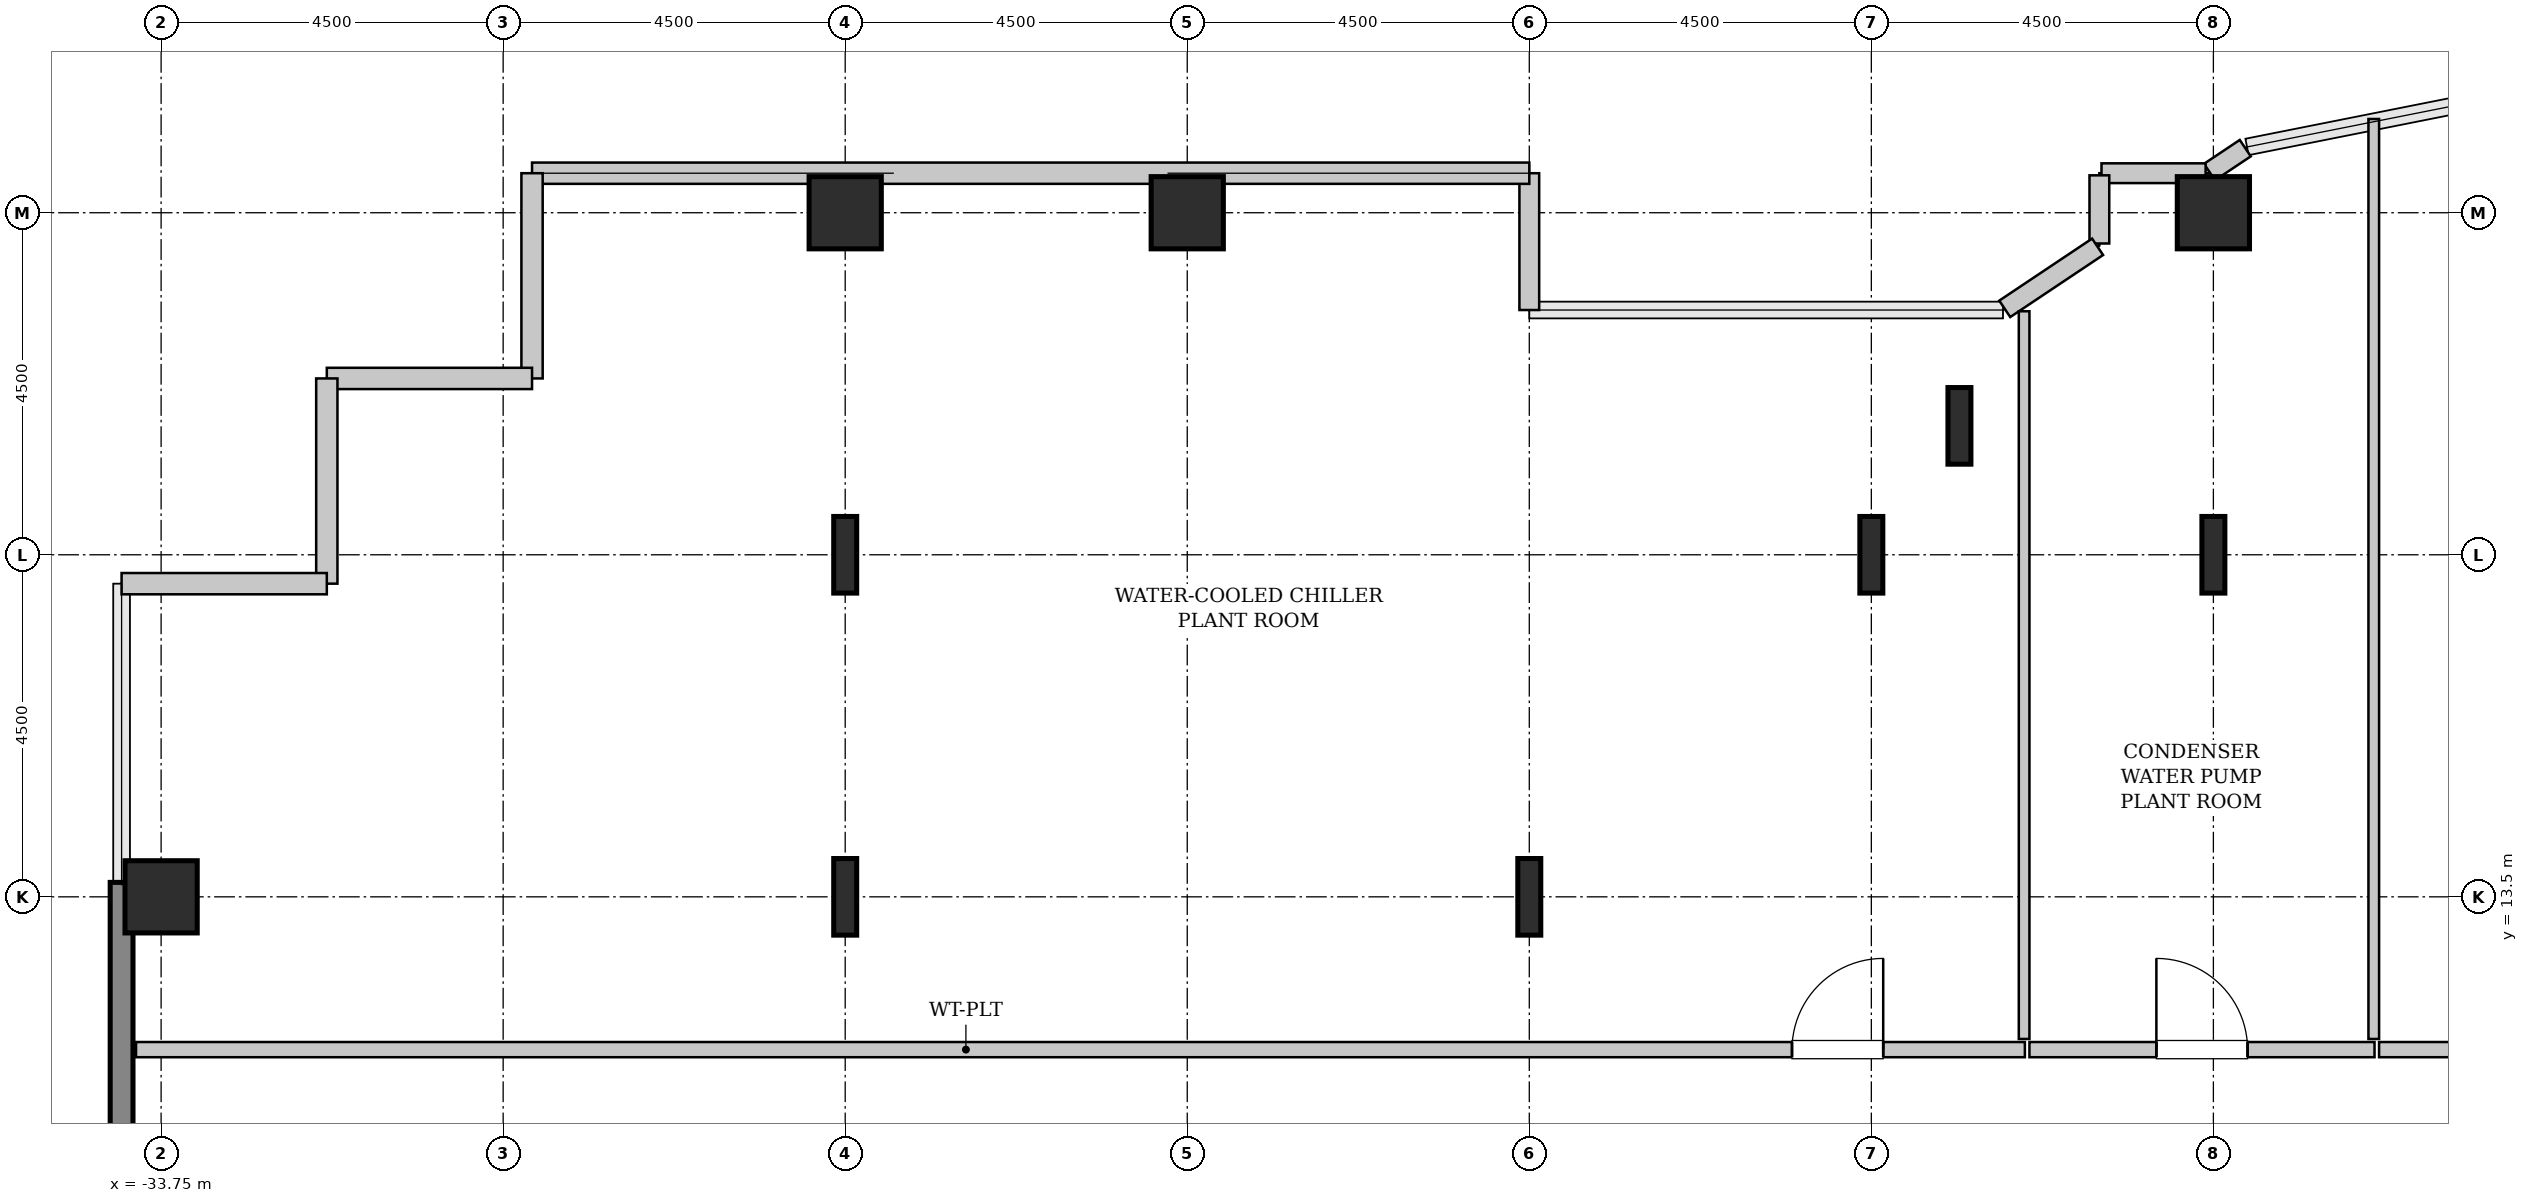
"""IFC4 building model, lengths in metres.
Left out: names, types, materials, properties, quantities, classifications, styles, units other than length and angle.
Written with IfcOpenShell. Run it as: python <this file> out.ifc"""

import sys

from ifc_helpers import new_model, si_unit, direction, frame, frame_2d, origin, origin_2d, place, context, subcontext, project, spatial, rectangle, hollow_rectangle, i_section, extrude, source, transform, mapped, element, fill, save


model = new_model("IFC4")
c1 = context("Model", 3, precision=1e-05, world=origin(), true_north=direction((0.0, 1.0)))
c2 = subcontext(c1, "Body", "Model", "MODEL_VIEW")
j1 = project(units=[si_unit("LENGTHUNIT", "METRE"), si_unit("PLANEANGLEUNIT", "RADIAN")], contexts=[c1])
p1 = place(None, origin())
s1 = spatial("IfcSite", under=j1, at=p1, CompositionType="ELEMENT")
p2 = place(p1, origin())
s2 = spatial("IfcBuilding", under=s1, at=p2, CompositionType="ELEMENT")
p3 = place(p2, frame((0.0, 0.0, 86.2)))
s3 = spatial("IfcBuildingStorey", under=s2, at=p3, CompositionType="ELEMENT", Elevation=86.2)
m1 = source(origin(), c2, "Body", "SweptSolid", [
    extrude(hollow_rectangle(XDim=0.95, YDim=0.95, WallThickness=0.045, InnerFilletRadius=0.045, OuterFilletRadius=0.09, at=origin_2d()), origin(), (0.0, 0.0, 1.0), 4.6),
])
p4 = place(p3, frame((-33.75, 13.5, 0.0), z_axis=(0.0, 0.0, 1.0), x_axis=(1.0, 0.0, 0.0)))
e1 = element("IfcColumn", 1, at=p4, inside=s3, PredefinedType="COLUMN", context=c2, shape_type="MappedRepresentation", body=[
    mapped(m1, transform((0.0, 0.0, 0.0), x_axis=(1.0, 0.0, 0.0), y_axis=(0.0, 1.0, 0.0), z_axis=(0.0, 0.0, 1.0), scale=1.0)),
])
m2 = source(origin(), c2, "Body", "SweptSolid", [
    extrude(i_section(OverallWidth=0.302, OverallDepth=1.008, WebThickness=0.021, FlangeThickness=0.04, FilletRadius=0.03, at=origin_2d()), origin(), (0.0, 0.0, 1.0), 4.6),
])
for number, where, z_axis, x_axis in (
    (2, (-24.75, 13.5, 0.0), (0.0, 0.0, 1.0), (1.0, 0.0, 0.0)),
    (3, (-24.75, 18.0, 0.0), (0.0, 0.0, 1.0), (1.0, 0.0, 0.0)),
):
    element("IfcColumn", number, at=place(p3, frame(where, z_axis=z_axis, x_axis=x_axis)), inside=s3, PredefinedType="COLUMN", context=c2, shape_type="MappedRepresentation", body=[
        mapped(m2, transform((0.0, 0.0, 0.0), x_axis=(1.0, 0.0, 0.0), y_axis=(0.0, 1.0, 0.0), z_axis=(0.0, 0.0, 1.0), scale=1.0)),
    ])
for number, where, z_axis, x_axis in (
    (4, (-24.75, 22.5, 0.0), (0.0, 0.0, 1.0), (1.0, 0.0, 0.0)),
    (5, (-20.25, 22.5, 0.0), (0.0, 0.0, 1.0), (1.0, 0.0, 0.0)),
):
    element("IfcColumn", number, at=place(p3, frame(where, z_axis=z_axis, x_axis=x_axis)), inside=s3, PredefinedType="COLUMN", context=c2, shape_type="MappedRepresentation", body=[
        mapped(m1, transform((0.0, 0.0, 0.0), x_axis=(1.0, 0.0, 0.0), y_axis=(0.0, 1.0, 0.0), z_axis=(0.0, 0.0, 1.0), scale=1.0)),
    ])
for number, where, z_axis, x_axis in (
    (6, (-15.75, 13.5, 0.0), (0.0, 0.0, 1.0), (1.0, 0.0, 0.0)),
    (7, (-11.25, 18.0, 0.0), (0.0, 0.0, 1.0), (1.0, 0.0, 0.0)),
    (8, (-10.091, 19.696, 0.0), (0.0, 0.0, 1.0), (1.0, 0.0, 0.0)),
    (9, (-6.75, 18.0, 0.0), (0.0, 0.0, 1.0), (1.0, 0.0, 0.0)),
):
    element("IfcColumn", number, at=place(p3, frame(where, z_axis=z_axis, x_axis=x_axis)), inside=s3, PredefinedType="COLUMN", context=c2, shape_type="MappedRepresentation", body=[
        mapped(m2, transform((0.0, 0.0, 0.0), x_axis=(1.0, 0.0, 0.0), y_axis=(0.0, 1.0, 0.0), z_axis=(0.0, 0.0, 1.0), scale=1.0)),
    ])
p5 = place(p3, frame((-6.75, 22.5, 0.0), z_axis=(0.0, 0.0, 1.0), x_axis=(1.0, 0.0, 0.0)))
e10 = element("IfcColumn", 10, at=p5, inside=s3, PredefinedType="COLUMN", context=c2, shape_type="MappedRepresentation", body=[
    mapped(m1, transform((0.0, 0.0, 0.0), x_axis=(1.0, 0.0, 0.0), y_axis=(0.0, 1.0, 0.0), z_axis=(0.0, 0.0, 1.0), scale=1.0)),
])
m3 = source(origin(), c2, "Body", "SweptSolid", [
    extrude(rectangle(XDim=9.38, YDim=0.3, at=frame_2d((4.69, 0.0))), origin(), (0.0, 0.0, 1.0), 4.35),
])
p6 = place(p3, frame((-34.27, 4.31, 0.0), z_axis=(0.0, 0.0, 1.0), x_axis=(0.0, 1.0, 0.0)))
e11 = element("IfcWall", 11, at=p6, inside=s3, PredefinedType="SHEAR", context=c2, shape_type="MappedRepresentation", body=[
    mapped(m3, transform((0.0, 0.0, 0.0), x_axis=(1.0, 0.0, 0.0), y_axis=(0.0, 1.0, 0.0), z_axis=(0.0, 0.0, 1.0), scale=1.0)),
])
m4 = source(origin(), c2, "Body", "SweptSolid", [
    extrude(rectangle(XDim=0.565, YDim=0.26, at=frame_2d((0.283, 0.0))), origin(), (0.0, 0.0, 1.0), 4.35),
])
p7 = place(p3, frame((-6.331, 23.35, 0.0), z_axis=(0.0, 0.0, 1.0), x_axis=(-0.831651492666, -0.555297933317, 0.0)))
e12 = element("IfcWall", 12, at=p7, inside=s3, PredefinedType="SOLIDWALL", context=c2, shape_type="MappedRepresentation", body=[
    mapped(m4, transform((0.0, 0.0, 0.0), x_axis=(1.0, 0.0, 0.0), y_axis=(0.0, 1.0, 0.0), z_axis=(0.0, 0.0, 1.0), scale=1.0)),
])
m5 = source(origin(), c2, "Body", "SweptSolid", [
    extrude(rectangle(XDim=1.37, YDim=0.26, at=frame_2d((0.685, 0.0))), origin(), (0.0, 0.0, 1.0), 4.35),
])
p8 = place(p3, frame((-6.852, 23.02, 0.0), z_axis=(0.0, 0.0, 1.0), x_axis=(-1.0, 0.0, 0.0)))
e13 = element("IfcWall", 13, at=p8, inside=s3, PredefinedType="SOLIDWALL", context=c2, shape_type="MappedRepresentation", body=[
    mapped(m5, transform((0.0, 0.0, 0.0), x_axis=(1.0, 0.0, 0.0), y_axis=(0.0, 1.0, 0.0), z_axis=(0.0, 0.0, 1.0), scale=1.0)),
])
m6 = source(origin(), c2, "Body", "SweptSolid", [
    extrude(rectangle(XDim=0.897, YDim=0.26, at=frame_2d((0.448, 0.0))), origin(), (0.0, 0.0, 1.0), 4.35),
])
p9 = place(p3, frame((-8.25, 22.992, 0.0), z_axis=(0.0, 0.0, 1.0), x_axis=(0.0, -1.0, 0.0)))
e14 = element("IfcWall", 14, at=p9, inside=s3, PredefinedType="SOLIDWALL", context=c2, shape_type="MappedRepresentation", body=[
    mapped(m6, transform((0.0, 0.0, 0.0), x_axis=(1.0, 0.0, 0.0), y_axis=(0.0, 1.0, 0.0), z_axis=(0.0, 0.0, 1.0), scale=1.0)),
])
m7 = source(origin(), c2, "Body", "SweptSolid", [
    extrude(rectangle(XDim=1.469, YDim=0.26, at=frame_2d((0.734, 0.0))), origin(), (0.0, 0.0, 1.0), 4.35),
])
p10 = place(p3, frame((-8.273, 22.052, 0.0), z_axis=(0.0, 0.0, 1.0), x_axis=(-0.831461760506, -0.555581983884, 0.0)))
e15 = element("IfcWall", 15, at=p10, inside=s3, PredefinedType="SOLIDWALL", context=c2, shape_type="MappedRepresentation", body=[
    mapped(m7, transform((0.0, 0.0, 0.0), x_axis=(1.0, 0.0, 0.0), y_axis=(0.0, 1.0, 0.0), z_axis=(0.0, 0.0, 1.0), scale=1.0)),
])
m8 = source(origin(), c2, "Body", "SweptSolid", [
    extrude(rectangle(XDim=1.8, YDim=0.26, at=frame_2d((0.9, 0.0))), origin(), (0.0, 0.0, 1.0), 4.35),
])
p11 = place(p3, frame((-15.75, 21.22, 0.0), z_axis=(0.0, 0.0, 1.0), x_axis=(0.0, 1.0, 0.0)))
e16 = element("IfcWall", 16, at=p11, inside=s3, PredefinedType="SOLIDWALL", context=c2, shape_type="MappedRepresentation", body=[
    mapped(m8, transform((0.0, 0.0, 0.0), x_axis=(1.0, 0.0, 0.0), y_axis=(0.0, 1.0, 0.0), z_axis=(0.0, 0.0, 1.0), scale=1.0)),
])
m9 = source(origin(), c2, "Body", "SweptSolid", [
    extrude(rectangle(XDim=13.12, YDim=0.28, at=frame_2d((6.56, 0.0))), origin(), (0.0, 0.0, 1.0), 1.1),
])
p12 = place(p3, frame((-15.75, 23.02, 0.0), z_axis=(0.0, 0.0, 1.0), x_axis=(-1.0, 0.0, 0.0)))
e17 = element("IfcWall", 17, at=p12, inside=s3, PredefinedType="SOLIDWALL", context=c2, shape_type="MappedRepresentation", body=[
    mapped(m9, transform((0.0, 0.0, 0.0), x_axis=(1.0, 0.0, 0.0), y_axis=(0.0, 1.0, 0.0), z_axis=(0.0, 0.0, 1.0), scale=1.0)),
])
m10 = source(origin(), c2, "Body", "SweptSolid", [
    extrude(rectangle(XDim=2.7, YDim=0.28, at=frame_2d((1.35, 0.0))), origin(), (0.0, 0.0, 1.0), 4.35),
])
for number, where, z_axis, x_axis in (
    (18, (-28.87, 23.02, 0.0), (0.0, 0.0, 1.0), (0.0, -1.0, 0.0)),
    (19, (-28.87, 20.32, 0.0), (0.0, 0.0, 1.0), (-1.0, 0.0, 0.0)),
    (20, (-31.57, 20.32, 0.0), (0.0, 0.0, 1.0), (0.0, -1.0, 0.0)),
    (21, (-31.57, 17.62, 0.0), (0.0, 0.0, 1.0), (-1.0, 0.0, 0.0)),
):
    element("IfcWall", number, at=place(p3, frame(where, z_axis=z_axis, x_axis=x_axis)), inside=s3, PredefinedType="SOLIDWALL", context=c2, shape_type="MappedRepresentation", body=[
        mapped(m10, transform((0.0, 0.0, 0.0), x_axis=(1.0, 0.0, 0.0), y_axis=(0.0, 1.0, 0.0), z_axis=(0.0, 0.0, 1.0), scale=1.0)),
    ])
m11 = source(origin(), c2, "Body", "SweptSolid", [
    extrude(rectangle(XDim=24.85, YDim=0.2, at=frame_2d((12.425, 0.0))), origin(), (0.0, 0.0, 1.0), 4.335),
])
p13 = place(p3, frame((-34.08, 11.49, 0.0), z_axis=(0.0, 0.0, 1.0), x_axis=(1.0, 0.0, 0.0)))
e22 = element("IfcWall", 22, at=p13, inside=s3, PredefinedType="SOLIDWALL", context=c2, shape_type="MappedRepresentation", body=[
    mapped(m11, transform((0.0, 0.0, 0.0), x_axis=(1.0, 0.0, 0.0), y_axis=(0.0, 1.0, 0.0), z_axis=(0.0, 0.0, 1.0), scale=1.0)),
])
p14 = place(p13, frame((21.786, 0.0, 0.0)))
e23 = element("IfcOpeningElement", 23, at=p14, cuts=e22, PredefinedType="OPENING", context=c2, shape_type="SweptSolid", body=[
    extrude(rectangle(XDim=1.2, YDim=2.15, at=frame_2d((0.6, 1.075))), frame((0.0, 0.11, 0.0), z_axis=(0.0, -1.0, 0.0), x_axis=(1.0, 0.0, 0.0)), (0.0, 0.0, 1.0), 0.22),
])
m12 = source(origin(), c2, "Body", "SweptSolid", [
    extrude(rectangle(XDim=9.574, YDim=0.14, at=frame_2d((4.787, 0.0))), origin(), (0.0, 0.0, 1.0), 4.335),
])
p15 = place(p3, frame((-9.24, 11.63, 0.0), z_axis=(0.0, 0.0, 1.0), x_axis=(0.0, 1.0, 0.0)))
e24 = element("IfcWall", 24, at=p15, inside=s3, PredefinedType="PARTITIONING", context=c2, shape_type="MappedRepresentation", body=[
    mapped(m12, transform((0.0, 0.0, 0.0), x_axis=(1.0, 0.0, 0.0), y_axis=(0.0, 1.0, 0.0), z_axis=(0.0, 0.0, 1.0), scale=1.0)),
])
m13 = source(origin(), c2, "Body", "SweptSolid", [
    extrude(rectangle(XDim=4.54, YDim=0.2, at=frame_2d((2.27, 0.0))), origin(), (0.0, 0.0, 1.0), 4.335),
])
p16 = place(p3, frame((-9.17, 11.49, 0.0), z_axis=(0.0, 0.0, 1.0), x_axis=(1.0, 0.0, 0.0)))
e25 = element("IfcWall", 25, at=p16, inside=s3, PredefinedType="SOLIDWALL", context=c2, shape_type="MappedRepresentation", body=[
    mapped(m13, transform((0.0, 0.0, 0.0), x_axis=(1.0, 0.0, 0.0), y_axis=(0.0, 1.0, 0.0), z_axis=(0.0, 0.0, 1.0), scale=1.0)),
])
p17 = place(p16, frame((1.67, 0.0, 0.0)))
e26 = element("IfcOpeningElement", 26, at=p17, cuts=e25, PredefinedType="OPENING", context=c2, shape_type="SweptSolid", body=[
    extrude(rectangle(XDim=1.2, YDim=2.15, at=frame_2d((0.6, 1.075))), frame((0.0, 0.11, 0.0), z_axis=(0.0, -1.0, 0.0), x_axis=(1.0, 0.0, 0.0)), (0.0, 0.0, 1.0), 0.22),
])
m14 = source(origin(), c2, "Body", "SweptSolid", [
    extrude(rectangle(XDim=12.104, YDim=0.14, at=frame_2d((6.052, 0.0))), origin(), (0.0, 0.0, 1.0), 4.335),
])
p18 = place(p3, frame((-4.64, 11.63, 0.0), z_axis=(0.0, 0.0, 1.0), x_axis=(0.0, 1.0, 0.0)))
e27 = element("IfcWall", 27, at=p18, inside=s3, PredefinedType="PARTITIONING", context=c2, shape_type="MappedRepresentation", body=[
    mapped(m14, transform((0.0, 0.0, 0.0), x_axis=(1.0, 0.0, 0.0), y_axis=(0.0, 1.0, 0.0), z_axis=(0.0, 0.0, 1.0), scale=1.0)),
])
p19 = place(p3, frame((-4.57, 11.49, 0.0), z_axis=(0.0, 0.0, 1.0), x_axis=(1.0, 0.0, 0.0)))
e28 = element("IfcWall", 28, at=p19, inside=s3, PredefinedType="SOLIDWALL", context=c2, shape_type="MappedRepresentation", body=[
    mapped(m13, transform((0.0, 0.0, 0.0), x_axis=(1.0, 0.0, 0.0), y_axis=(0.0, 1.0, 0.0), z_axis=(0.0, 0.0, 1.0), scale=1.0)),
])
p20 = place(p19, frame((1.67, 0.0, 0.0)))
e29 = element("IfcOpeningElement", 29, at=p20, cuts=e28, PredefinedType="OPENING", context=c2, shape_type="SweptSolid", body=[
    extrude(rectangle(XDim=1.2, YDim=2.15, at=frame_2d((0.6, 1.075))), frame((0.0, 0.11, 0.0), z_axis=(0.0, -1.0, 0.0), x_axis=(1.0, 0.0, 0.0)), (0.0, 0.0, 1.0), 0.22),
])
m15 = source(origin(), c2, "Body", "SweptSolid", [
    extrude(rectangle(XDim=1.2, YDim=2.15, at=frame_2d((0.6, 1.075))), frame((0.0, 0.025, 0.0), z_axis=(0.0, -1.0, 0.0), x_axis=(1.0, 0.0, 0.0)), (0.0, 0.0, 1.0), 0.05),
])
p21 = place(p14, origin())
e30 = element("IfcDoor", 30, at=p21, inside=s3, OperationType="SINGLE_SWING_RIGHT", PredefinedType="DOOR", context=c2, shape_type="MappedRepresentation", body=[
    mapped(m15, transform((0.0, 0.0, 0.0), x_axis=(1.0, 0.0, 0.0), y_axis=(0.0, 1.0, 0.0), z_axis=(0.0, 0.0, 1.0), scale=1.0)),
])
fill(e23, e30)
p22 = place(p17, origin())
e31 = element("IfcDoor", 31, at=p22, inside=s3, OperationType="SINGLE_SWING_LEFT", PredefinedType="DOOR", context=c2, shape_type="MappedRepresentation", body=[
    mapped(m15, transform((0.0, 0.0, 0.0), x_axis=(1.0, 0.0, 0.0), y_axis=(0.0, 1.0, 0.0), z_axis=(0.0, 0.0, 1.0), scale=1.0)),
])
fill(e26, e31)
save(model, sys.argv[1])
